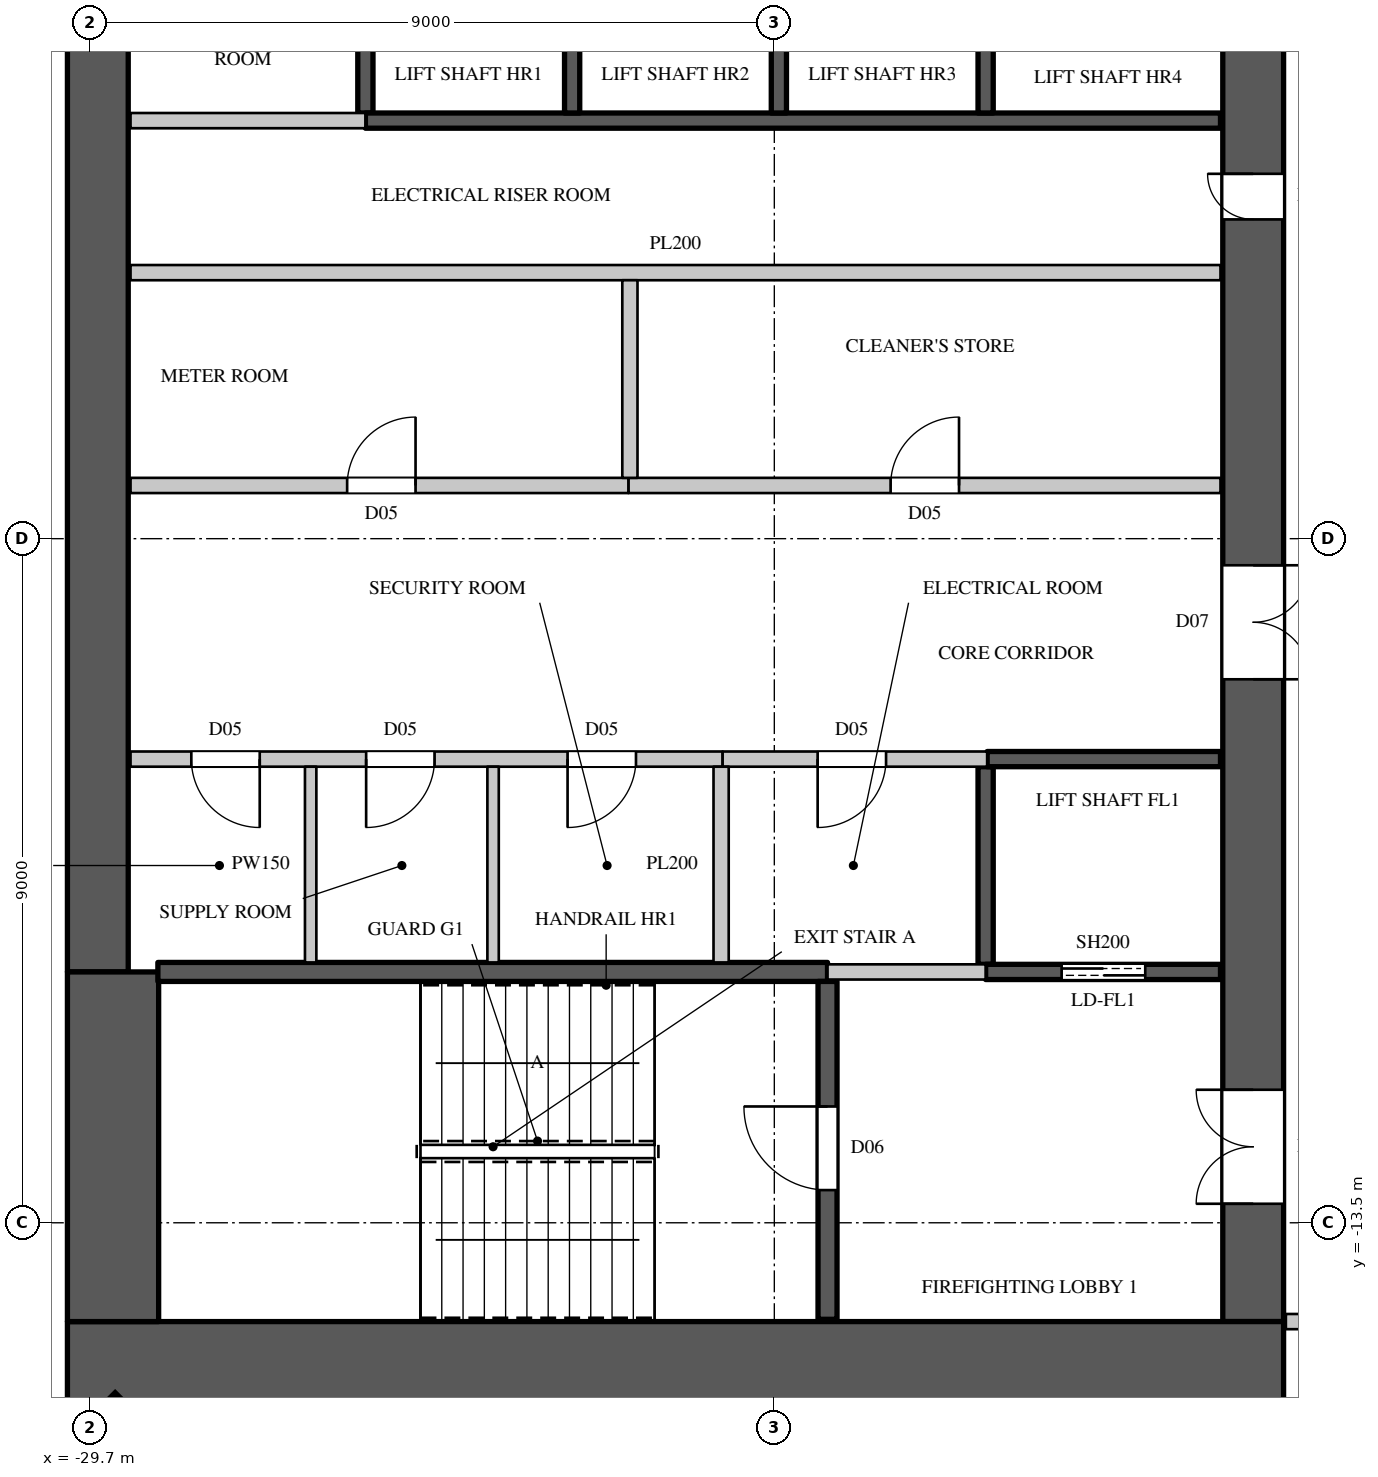
"""IFC4 building model, lengths in metres.
Left out: names, types, materials, properties, quantities, classifications, styles, units other than length and angle.
Written with IfcOpenShell. Run it as: python <this file> out.ifc"""

import sys

from ifc_helpers import new_model, si_unit, direction, frame, frame_2d, origin, origin_2d, place, context, subcontext, project, spatial, rectangle, extrude, element, fill, save


model = new_model("IFC4")
c1 = context("Model", 3, precision=1e-05, world=origin(), true_north=direction((0.0, 1.0)))
c2 = subcontext(c1, "Body", "Model", "MODEL_VIEW")
j1 = project(units=[si_unit("LENGTHUNIT", "METRE"), si_unit("PLANEANGLEUNIT", "RADIAN")], contexts=[c1])
p1 = place(None, origin())
s1 = spatial("IfcSite", under=j1, at=p1, CompositionType="ELEMENT")
p2 = place(p1, origin())
s2 = spatial("IfcBuilding", under=s1, at=p2, CompositionType="ELEMENT")
p3 = place(p2, frame((0.0, 0.0, 168.7)))
s3 = spatial("IfcBuildingStorey", under=s2, at=p3, CompositionType="ELEMENT", Elevation=168.7)
p4 = place(p3, frame((-29.443, -16.443, 0.0), z_axis=(0.0, 0.0, 1.0), x_axis=(0.707106781187, -0.707106781187, 0.0)))
e1 = element("IfcColumn", 1, at=p4, inside=s3, PredefinedType="COLUMN", context=c2, shape_type="SweptSolid", body=[
    extrude(rectangle(XDim=0.9, YDim=1.1, at=origin_2d()), origin(), (0.0, 0.0, 1.0), 4.1),
])
p5 = place(p3, frame((-30.0, -15.4, 0.0), z_axis=(0.0, 0.0, 1.0), x_axis=(1.0, 0.0, 0.0)))
e2 = element("IfcWall", 2, at=p5, inside=s3, PredefinedType="SHEAR", context=c2, shape_type="SweptSolid", body=[
    extrude(rectangle(XDim=16.0, YDim=1.2, at=frame_2d((8.0, 0.0))), origin(), (0.0, 0.0, 1.0), 4.1),
])
p6 = place(p3, frame((-14.4, -14.8, 0.0), z_axis=(0.0, 0.0, 1.0), x_axis=(0.0, 1.0, 0.0)))
e3 = element("IfcWall", 3, at=p6, inside=s3, PredefinedType="SHEAR", context=c2, shape_type="SweptSolid", body=[
    extrude(rectangle(XDim=29.6, YDim=0.8, at=frame_2d((14.8, 0.0))), origin(), (0.0, 0.0, 1.0), 4.1),
])
p7 = place(p6, frame((1.55, 0.0, 0.0)))
e4 = element("IfcOpeningElement", 4, at=p7, cuts=e3, PredefinedType="OPENING", context=c2, shape_type="SweptSolid", body=[
    extrude(rectangle(XDim=1.5, YDim=2.4, at=frame_2d((0.75, 1.2))), frame((0.0, 0.41, 0.0), z_axis=(0.0, -1.0, 0.0), x_axis=(1.0, 0.0, 0.0)), (0.0, 0.0, 1.0), 0.82),
])
p8 = place(p6, frame((26.55, 0.0, 0.0)))
e5 = element("IfcOpeningElement", 5, at=p8, cuts=e3, PredefinedType="OPENING", context=c2, shape_type="SweptSolid", body=[
    extrude(rectangle(XDim=1.5, YDim=2.4, at=frame_2d((0.75, 1.2))), frame((0.0, 0.41, 0.0), z_axis=(0.0, -1.0, 0.0), x_axis=(1.0, 0.0, 0.0)), (0.0, 0.0, 1.0), 0.82),
])
p9 = place(p6, frame((8.45, 0.0, 0.0)))
e6 = element("IfcOpeningElement", 6, at=p9, cuts=e3, PredefinedType="OPENING", context=c2, shape_type="SweptSolid", body=[
    extrude(rectangle(XDim=1.5, YDim=2.4, at=frame_2d((0.75, 1.2))), frame((0.0, 0.41, 0.0), z_axis=(0.0, -1.0, 0.0), x_axis=(1.0, 0.0, 0.0)), (0.0, 0.0, 1.0), 0.82),
])
p10 = place(p6, frame((19.65, 0.0, 0.0)))
e7 = element("IfcOpeningElement", 7, at=p10, cuts=e3, PredefinedType="OPENING", context=c2, shape_type="SweptSolid", body=[
    extrude(rectangle(XDim=1.5, YDim=2.4, at=frame_2d((0.75, 1.2))), frame((0.0, 0.41, 0.0), z_axis=(0.0, -1.0, 0.0), x_axis=(1.0, 0.0, 0.0)), (0.0, 0.0, 1.0), 0.82),
])
p11 = place(p6, frame((14.5, 0.0, 0.0)))
e8 = element("IfcOpeningElement", 8, at=p11, cuts=e3, PredefinedType="OPENING", context=c2, shape_type="SweptSolid", body=[
    extrude(rectangle(XDim=0.6, YDim=2.0, at=frame_2d((0.3, 1.0))), frame((0.0, 0.41, 0.0), z_axis=(0.0, -1.0, 0.0), x_axis=(1.0, 0.0, 0.0)), (0.0, 0.0, 1.0), 0.82),
])
p12 = place(p3, frame((-29.6, -10.2, 0.0), z_axis=(0.0, 0.0, 1.0), x_axis=(0.0, 1.0, 0.0)))
e9 = element("IfcWall", 9, at=p12, inside=s3, PredefinedType="SHEAR", context=c2, shape_type="SweptSolid", body=[
    extrude(rectangle(XDim=20.4, YDim=0.8, at=frame_2d((10.2, 0.0))), origin(), (0.0, 0.0, 1.0), 4.1),
])
p13 = place(p3, frame((-29.4, -14.8, 0.0), z_axis=(0.0, 0.0, 1.0), x_axis=(0.0, 1.0, 0.0)))
e10 = element("IfcWall", 10, at=p13, inside=s3, PredefinedType="SHEAR", context=c2, shape_type="SweptSolid", body=[
    extrude(rectangle(XDim=4.6, YDim=1.2, at=frame_2d((2.3, 0.0))), origin(), (0.0, 0.0, 1.0), 4.1),
])
p14 = place(p3, frame((-29.17, -7.4, 0.0), z_axis=(0.0, 0.0, 1.0), x_axis=(1.0, 0.0, 0.0)))
e11 = element("IfcWall", 11, at=p14, inside=s3, PredefinedType="PARTITIONING", context=c2, shape_type="SweptSolid", body=[
    extrude(rectangle(XDim=7.79, YDim=0.2, at=frame_2d((3.895, 0.0))), origin(), (0.0, 0.0, 1.0), 3.8),
])
p15 = place(p14, frame((0.8, 0.0, 0.0)))
e12 = element("IfcOpeningElement", 12, at=p15, cuts=e11, PredefinedType="OPENING", context=c2, shape_type="SweptSolid", body=[
    extrude(rectangle(XDim=0.9, YDim=2.2, at=frame_2d((0.45, 1.1))), frame((0.0, 0.11, 0.0), z_axis=(0.0, -1.0, 0.0), x_axis=(1.0, 0.0, 0.0)), (0.0, 0.0, 1.0), 0.22),
])
p16 = place(p14, frame((3.1, 0.0, 0.0)))
e13 = element("IfcOpeningElement", 13, at=p16, cuts=e11, PredefinedType="OPENING", context=c2, shape_type="SweptSolid", body=[
    extrude(rectangle(XDim=0.9, YDim=2.2, at=frame_2d((0.45, 1.1))), frame((0.0, 0.11, 0.0), z_axis=(0.0, -1.0, 0.0), x_axis=(1.0, 0.0, 0.0)), (0.0, 0.0, 1.0), 0.22),
])
p17 = place(p14, frame((5.75, 0.0, 0.0)))
e14 = element("IfcOpeningElement", 14, at=p17, cuts=e11, PredefinedType="OPENING", context=c2, shape_type="SweptSolid", body=[
    extrude(rectangle(XDim=0.9, YDim=2.2, at=frame_2d((0.45, 1.1))), frame((0.0, 0.11, 0.0), z_axis=(0.0, -1.0, 0.0), x_axis=(1.0, 0.0, 0.0)), (0.0, 0.0, 1.0), 0.22),
])
p18 = place(p3, frame((-22.62, -3.8, 0.0), z_axis=(0.0, 0.0, 1.0), x_axis=(1.0, 0.0, 0.0)))
e15 = element("IfcWall", 15, at=p18, inside=s3, PredefinedType="PARTITIONING", context=c2, shape_type="SweptSolid", body=[
    extrude(rectangle(XDim=7.79, YDim=0.2, at=frame_2d((3.895, 0.0))), origin(), (0.0, 0.0, 1.0), 3.8),
])
p19 = place(p18, frame((3.45, 0.0, 0.0)))
e16 = element("IfcOpeningElement", 16, at=p19, cuts=e15, PredefinedType="OPENING", context=c2, shape_type="SweptSolid", body=[
    extrude(rectangle(XDim=0.9, YDim=2.2, at=frame_2d((0.45, 1.1))), frame((0.0, 0.11, 0.0), z_axis=(0.0, -1.0, 0.0), x_axis=(1.0, 0.0, 0.0)), (0.0, 0.0, 1.0), 0.22),
])
p20 = place(p3, frame((-13.97, -14.8, 0.0), z_axis=(0.0, 0.0, 1.0), x_axis=(1.0, 0.0, 0.0)))
e17 = element("IfcWall", 17, at=p20, inside=s3, PredefinedType="PARTITIONING", context=c2, shape_type="SweptSolid", body=[
    extrude(rectangle(XDim=2.87, YDim=0.2, at=frame_2d((1.435, 0.0))), origin(), (0.0, 0.0, 1.0), 3.8),
])
for number, where, z_axis, x_axis in (
    (18, (-26.8, -10.075, 0.0), (0.0, 0.0, 1.0), (0.0, 1.0, 0.0)),
    (19, (-24.4, -10.075, 0.0), (0.0, 0.0, 1.0), (0.0, 1.0, 0.0)),
):
    element("IfcWall", number, at=place(p3, frame(where, z_axis=z_axis, x_axis=x_axis)), inside=s3, PredefinedType="PARTITIONING", context=c2, shape_type="SweptSolid", body=[
        extrude(rectangle(XDim=2.575, YDim=0.15, at=frame_2d((1.288, 0.0))), origin(), (0.0, 0.0, 1.0), 3.8),
    ])
p21 = place(p3, frame((-29.17, -3.8, 0.0), z_axis=(0.0, 0.0, 1.0), x_axis=(1.0, 0.0, 0.0)))
e20 = element("IfcWall", 20, at=p21, inside=s3, PredefinedType="PARTITIONING", context=c2, shape_type="SweptSolid", body=[
    extrude(rectangle(XDim=6.55, YDim=0.2, at=frame_2d((3.275, 0.0))), origin(), (0.0, 0.0, 1.0), 3.8),
])
p22 = place(p21, frame((2.85, 0.0, 0.0)))
e21 = element("IfcOpeningElement", 21, at=p22, cuts=e20, PredefinedType="OPENING", context=c2, shape_type="SweptSolid", body=[
    extrude(rectangle(XDim=0.9, YDim=2.2, at=frame_2d((0.45, 1.1))), frame((0.0, 0.11, 0.0), z_axis=(0.0, -1.0, 0.0), x_axis=(1.0, 0.0, 0.0)), (0.0, 0.0, 1.0), 0.22),
])
p23 = place(p3, frame((-29.17, -1.0, 0.0), z_axis=(0.0, 0.0, 1.0), x_axis=(1.0, 0.0, 0.0)))
e22 = element("IfcWall", 22, at=p23, inside=s3, PredefinedType="PARTITIONING", context=c2, shape_type="SweptSolid", body=[
    extrude(rectangle(XDim=14.34, YDim=0.2, at=frame_2d((7.17, 0.0))), origin(), (0.0, 0.0, 1.0), 3.8),
])
p24 = place(p3, frame((-29.17, 1.0, 0.0), z_axis=(0.0, 0.0, 1.0), x_axis=(1.0, 0.0, 0.0)))
e23 = element("IfcWall", 23, at=p24, inside=s3, PredefinedType="PARTITIONING", context=c2, shape_type="SweptSolid", body=[
    extrude(rectangle(XDim=3.09, YDim=0.2, at=frame_2d((1.545, 0.0))), origin(), (0.0, 0.0, 1.0), 3.8),
])
p25 = place(p3, frame((-22.6, -3.7, 0.0), z_axis=(0.0, 0.0, 1.0), x_axis=(0.0, 1.0, 0.0)))
e24 = element("IfcWall", 24, at=p25, inside=s3, PredefinedType="PARTITIONING", context=c2, shape_type="SweptSolid", body=[
    extrude(rectangle(XDim=2.6, YDim=0.2, at=frame_2d((1.3, 0.0))), origin(), (0.0, 0.0, 1.0), 3.8),
])
p26 = place(p3, frame((-21.38, -7.4, 0.0), z_axis=(0.0, 0.0, 1.0), x_axis=(1.0, 0.0, 0.0)))
e25 = element("IfcWall", 25, at=p26, inside=s3, PredefinedType="PARTITIONING", context=c2, shape_type="SweptSolid", body=[
    extrude(rectangle(XDim=3.48, YDim=0.2, at=frame_2d((1.74, 0.0))), origin(), (0.0, 0.0, 1.0), 3.8),
])
p27 = place(p26, frame((1.25, 0.0, 0.0)))
e26 = element("IfcOpeningElement", 26, at=p27, cuts=e25, PredefinedType="OPENING", context=c2, shape_type="SweptSolid", body=[
    extrude(rectangle(XDim=0.9, YDim=2.2, at=frame_2d((0.45, 1.1))), frame((0.0, 0.11, 0.0), z_axis=(0.0, -1.0, 0.0), x_axis=(1.0, 0.0, 0.0)), (0.0, 0.0, 1.0), 0.22),
])
p28 = place(p3, frame((-21.4, -10.075, 0.0), z_axis=(0.0, 0.0, 1.0), x_axis=(0.0, 1.0, 0.0)))
e27 = element("IfcWall", 27, at=p28, inside=s3, PredefinedType="PARTITIONING", context=c2, shape_type="SweptSolid", body=[
    extrude(rectangle(XDim=2.575, YDim=0.2, at=frame_2d((1.288, 0.0))), origin(), (0.0, 0.0, 1.0), 3.8),
])
p29 = place(p3, frame((-20.0, -10.2, 0.0), z_axis=(0.0, 0.0, 1.0), x_axis=(1.0, 0.0, 0.0)))
e28 = element("IfcWall", 28, at=p29, inside=s3, PredefinedType="PARTITIONING", context=c2, shape_type="SweptSolid", body=[
    extrude(rectangle(XDim=2.08, YDim=0.2, at=frame_2d((1.04, 0.0))), origin(), (0.0, 0.0, 1.0), 3.8),
])
p30 = place(p3, frame((-26.08, 1.1, 0.0), z_axis=(0.0, 0.0, 1.0), x_axis=(0.0, 1.0, 0.0)))
e29 = element("IfcWall", 29, at=p30, inside=s3, PredefinedType="SHEAR", context=c2, shape_type="SweptSolid", body=[
    extrude(rectangle(XDim=2.6, YDim=0.2, at=frame_2d((1.3, 0.0))), origin(), (0.0, 0.0, 1.0), 3.8),
])
p31 = place(p3, frame((-26.08, 1.0, 0.0), z_axis=(0.0, 0.0, 1.0), x_axis=(1.0, 0.0, 0.0)))
e30 = element("IfcWall", 30, at=p31, inside=s3, PredefinedType="SHEAR", context=c2, shape_type="SweptSolid", body=[
    extrude(rectangle(XDim=11.25, YDim=0.2, at=frame_2d((5.625, 0.0))), origin(), (0.0, 0.0, 1.0), 3.8),
])
for number, where, z_axis, x_axis in (
    (31, (-23.36, 1.1, 0.0), (0.0, 0.0, 1.0), (0.0, 1.0, 0.0)),
    (32, (-20.64, 1.1, 0.0), (0.0, 0.0, 1.0), (0.0, 1.0, 0.0)),
):
    element("IfcWall", number, at=place(p3, frame(where, z_axis=z_axis, x_axis=x_axis)), inside=s3, PredefinedType="SHEAR", context=c2, shape_type="SweptSolid", body=[
        extrude(rectangle(XDim=2.6, YDim=0.2, at=frame_2d((1.3, 0.0))), origin(), (0.0, 0.0, 1.0), 4.1),
    ])
p32 = place(p3, frame((-17.92, -10.1, 0.0), z_axis=(0.0, 0.0, 1.0), x_axis=(0.0, 1.0, 0.0)))
e33 = element("IfcWall", 33, at=p32, inside=s3, PredefinedType="SHEAR", context=c2, shape_type="SweptSolid", body=[
    extrude(rectangle(XDim=2.6, YDim=0.2, at=frame_2d((1.3, 0.0))), origin(), (0.0, 0.0, 1.0), 3.8),
])
p33 = place(p3, frame((-17.92, -10.2, 0.0), z_axis=(0.0, 0.0, 1.0), x_axis=(1.0, 0.0, 0.0)))
e34 = element("IfcWall", 34, at=p33, inside=s3, PredefinedType="SHEAR", context=c2, shape_type="SweptSolid", body=[
    extrude(rectangle(XDim=3.09, YDim=0.2, at=frame_2d((1.545, 0.0))), origin(), (0.0, 0.0, 1.0), 3.8),
])
p34 = place(p33, frame((1.0, 0.0, 0.0)))
e35 = element("IfcOpeningElement", 35, at=p34, cuts=e34, PredefinedType="OPENING", context=c2, shape_type="SweptSolid", body=[
    extrude(rectangle(XDim=1.1, YDim=2.2, at=frame_2d((0.55, 1.1))), frame((0.0, 0.11, 0.0), z_axis=(0.0, -1.0, 0.0), x_axis=(1.0, 0.0, 0.0)), (0.0, 0.0, 1.0), 0.22),
])
p35 = place(p3, frame((-17.9, -7.4, 0.0), z_axis=(0.0, 0.0, 1.0), x_axis=(1.0, 0.0, 0.0)))
e36 = element("IfcWall", 36, at=p35, inside=s3, PredefinedType="SHEAR", context=c2, shape_type="SweptSolid", body=[
    extrude(rectangle(XDim=3.07, YDim=0.2, at=frame_2d((1.535, 0.0))), origin(), (0.0, 0.0, 1.0), 3.8),
])
p36 = place(p3, frame((-17.92, 1.1, 0.0), z_axis=(0.0, 0.0, 1.0), x_axis=(0.0, 1.0, 0.0)))
e37 = element("IfcWall", 37, at=p36, inside=s3, PredefinedType="SHEAR", context=c2, shape_type="SweptSolid", body=[
    extrude(rectangle(XDim=2.6, YDim=0.2, at=frame_2d((1.3, 0.0))), origin(), (0.0, 0.0, 1.0), 4.1),
])
p37 = place(p3, frame((-28.81, -10.2, 0.0), z_axis=(0.0, 0.0, 1.0), x_axis=(1.0, 0.0, 0.0)))
e38 = element("IfcWall", 38, at=p37, inside=s3, PredefinedType="SHEAR", context=c2, shape_type="SweptSolid", body=[
    extrude(rectangle(XDim=8.81, YDim=0.25, at=frame_2d((4.405, 0.0))), origin(), (0.0, 0.0, 1.0), 3.8),
])
p38 = place(p3, frame((-20.0, -14.77, 0.0), z_axis=(0.0, 0.0, 1.0), x_axis=(0.0, 1.0, 0.0)))
e39 = element("IfcWall", 39, at=p38, inside=s3, PredefinedType="SHEAR", context=c2, shape_type="SweptSolid", body=[
    extrude(rectangle(XDim=4.445, YDim=0.25, at=frame_2d((2.223, 0.0))), origin(), (0.0, 0.0, 1.0), 3.8),
])
p39 = place(p38, frame((1.7, 0.0, 0.0)))
e40 = element("IfcOpeningElement", 40, at=p39, cuts=e39, PredefinedType="OPENING", context=c2, shape_type="SweptSolid", body=[
    extrude(rectangle(XDim=1.1, YDim=2.2, at=frame_2d((0.55, 1.1))), frame((0.0, 0.135, 0.0), z_axis=(0.0, -1.0, 0.0), x_axis=(1.0, 0.0, 0.0)), (0.0, 0.0, 1.0), 0.27),
])
p40 = place(p39, origin())
e41 = element("IfcDoor", 41, at=p40, inside=s3, OperationType="SINGLE_SWING_RIGHT", PredefinedType="DOOR", context=c2, shape_type="SweptSolid", body=[
    extrude(rectangle(XDim=1.1, YDim=2.2, at=frame_2d((0.55, 1.1))), frame((0.0, 0.025, 0.0), z_axis=(0.0, -1.0, 0.0), x_axis=(1.0, 0.0, 0.0)), (0.0, 0.0, 1.0), 0.05),
])
fill(e40, e41)
p41 = place(p15, origin())
e42 = element("IfcDoor", 42, at=p41, inside=s3, OperationType="SINGLE_SWING_LEFT", PredefinedType="DOOR", context=c2, shape_type="SweptSolid", body=[
    extrude(rectangle(XDim=0.9, YDim=2.2, at=frame_2d((0.45, 1.1))), frame((0.0, 0.025, 0.0), z_axis=(0.0, -1.0, 0.0), x_axis=(1.0, 0.0, 0.0)), (0.0, 0.0, 1.0), 0.05),
])
fill(e12, e42)
p42 = place(p16, origin())
e43 = element("IfcDoor", 43, at=p42, inside=s3, OperationType="SINGLE_SWING_RIGHT", PredefinedType="DOOR", context=c2, shape_type="SweptSolid", body=[
    extrude(rectangle(XDim=0.9, YDim=2.2, at=frame_2d((0.45, 1.1))), frame((0.0, 0.025, 0.0), z_axis=(0.0, -1.0, 0.0), x_axis=(1.0, 0.0, 0.0)), (0.0, 0.0, 1.0), 0.05),
])
fill(e13, e43)
p43 = place(p17, origin())
e44 = element("IfcDoor", 44, at=p43, inside=s3, OperationType="SINGLE_SWING_RIGHT", PredefinedType="DOOR", context=c2, shape_type="SweptSolid", body=[
    extrude(rectangle(XDim=0.9, YDim=2.2, at=frame_2d((0.45, 1.1))), frame((0.0, 0.025, 0.0), z_axis=(0.0, -1.0, 0.0), x_axis=(1.0, 0.0, 0.0)), (0.0, 0.0, 1.0), 0.05),
])
fill(e14, e44)
p44 = place(p27, origin())
e45 = element("IfcDoor", 45, at=p44, inside=s3, OperationType="SINGLE_SWING_RIGHT", PredefinedType="DOOR", context=c2, shape_type="SweptSolid", body=[
    extrude(rectangle(XDim=0.9, YDim=2.2, at=frame_2d((0.45, 1.1))), frame((0.0, 0.025, 0.0), z_axis=(0.0, -1.0, 0.0), x_axis=(1.0, 0.0, 0.0)), (0.0, 0.0, 1.0), 0.05),
])
fill(e26, e45)
p45 = place(p22, origin())
e46 = element("IfcDoor", 46, at=p45, inside=s3, OperationType="SINGLE_SWING_RIGHT", PredefinedType="DOOR", context=c2, shape_type="SweptSolid", body=[
    extrude(rectangle(XDim=0.9, YDim=2.2, at=frame_2d((0.45, 1.1))), frame((0.0, 0.025, 0.0), z_axis=(0.0, -1.0, 0.0), x_axis=(1.0, 0.0, 0.0)), (0.0, 0.0, 1.0), 0.05),
])
fill(e21, e46)
p46 = place(p19, origin())
e47 = element("IfcDoor", 47, at=p46, inside=s3, OperationType="SINGLE_SWING_RIGHT", PredefinedType="DOOR", context=c2, shape_type="SweptSolid", body=[
    extrude(rectangle(XDim=0.9, YDim=2.2, at=frame_2d((0.45, 1.1))), frame((0.0, 0.025, 0.0), z_axis=(0.0, -1.0, 0.0), x_axis=(1.0, 0.0, 0.0)), (0.0, 0.0, 1.0), 0.05),
])
fill(e16, e47)
p47 = place(p34, origin())
e48 = element("IfcDoor", 48, at=p47, inside=s3, OperationType="DOUBLE_DOOR_SLIDING", PredefinedType="DOOR", context=c2, shape_type="SweptSolid", body=[
    extrude(rectangle(XDim=1.1, YDim=2.2, at=frame_2d((0.55, 1.1))), frame((0.0, 0.025, 0.0), z_axis=(0.0, -1.0, 0.0), x_axis=(1.0, 0.0, 0.0)), (0.0, 0.0, 1.0), 0.05),
])
fill(e35, e48)
p48 = place(p7, origin())
e49 = element("IfcDoor", 49, at=p48, inside=s3, OperationType="DOUBLE_DOOR_SINGLE_SWING", PredefinedType="DOOR", context=c2, shape_type="SweptSolid", body=[
    extrude(rectangle(XDim=1.5, YDim=2.4, at=frame_2d((0.75, 1.2))), frame((0.0, 0.395, 0.0), z_axis=(0.0, -1.0, 0.0), x_axis=(1.0, 0.0, 0.0)), (0.0, 0.0, 1.0), 0.05),
])
fill(e4, e49)
p49 = place(p9, origin())
e50 = element("IfcDoor", 50, at=p49, inside=s3, OperationType="DOUBLE_DOOR_SINGLE_SWING", PredefinedType="DOOR", context=c2, shape_type="SweptSolid", body=[
    extrude(rectangle(XDim=1.5, YDim=2.4, at=frame_2d((0.75, 1.2))), frame((0.0, -0.345, 0.0), z_axis=(0.0, -1.0, 0.0), x_axis=(1.0, 0.0, 0.0)), (0.0, 0.0, 1.0), 0.05),
])
fill(e6, e50)
p50 = place(p11, origin())
e51 = element("IfcDoor", 51, at=p50, inside=s3, OperationType="SINGLE_SWING_RIGHT", PredefinedType="DOOR", context=c2, shape_type="SweptSolid", body=[
    extrude(rectangle(XDim=0.6, YDim=2.0, at=frame_2d((0.3, 1.0))), frame((0.0, 0.395, 0.0), z_axis=(0.0, -1.0, 0.0), x_axis=(1.0, 0.0, 0.0)), (0.0, 0.0, 1.0), 0.05),
])
fill(e8, e51)
save(model, sys.argv[1])
